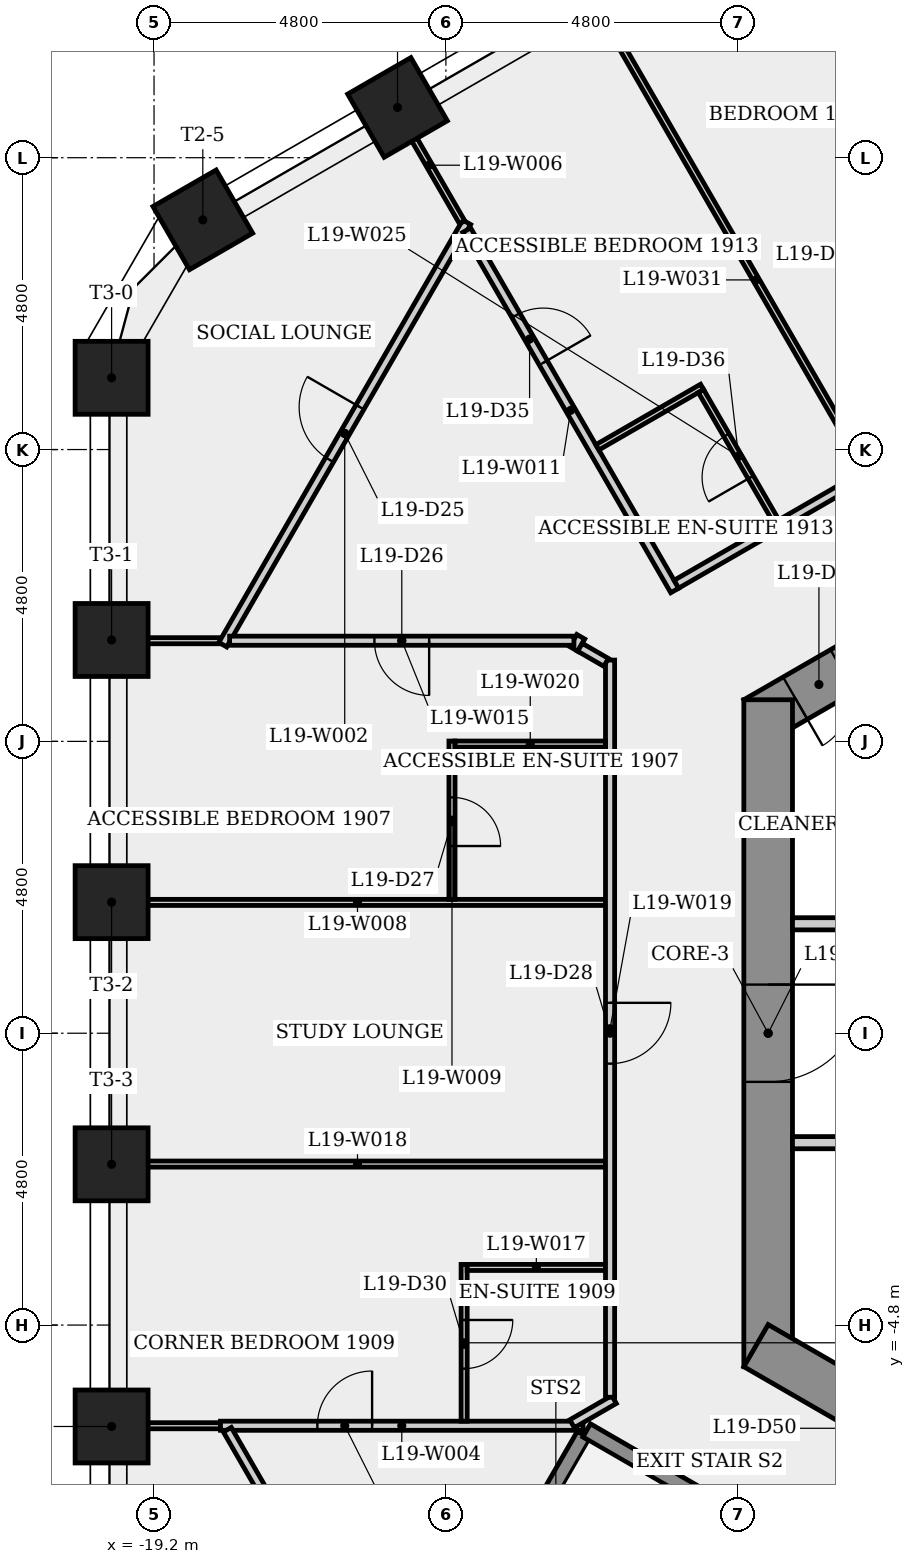
"""IFC4 building model, lengths in metres.
Left out: names, types, materials, properties, quantities, classifications, styles, units other than length and angle.
Written with IfcOpenShell. Run it as: python <this file> out.ifc"""

import sys

from ifc_helpers import new_model, si_unit, direction, frame, frame_2d, origin, origin_2d, place, context, subcontext, project, spatial, rectangle, extrude, element, fill, save


model = new_model("IFC4")
c1 = context("Model", 3, precision=1e-05, world=origin(), true_north=direction((0.0, 1.0)))
c2 = subcontext(c1, "Body", "Model", "MODEL_VIEW")
j1 = project(units=[si_unit("LENGTHUNIT", "METRE"), si_unit("PLANEANGLEUNIT", "RADIAN")], contexts=[c1])
p1 = place(None, origin())
s1 = spatial("IfcSite", under=j1, at=p1, CompositionType="ELEMENT")
p2 = place(p1, origin())
s2 = spatial("IfcBuilding", under=s1, at=p2, CompositionType="ELEMENT")
p3 = place(p2, frame((0.0, 0.0, 74.3)))
s3 = spatial("IfcBuildingStorey", under=s2, at=p3, CompositionType="ELEMENT", Elevation=74.3)
p4 = place(p3, frame((0.2, 10.623, 0.0), z_axis=(0.0, 0.0, 1.0), x_axis=(-0.866023993627, -0.500002442456, 0.0)))
e1 = element("IfcWall", 1, at=p4, inside=s3, PredefinedType="SHEAR", context=c2, shape_type="SweptSolid", body=[
    extrude(rectangle(XDim=10.97, YDim=0.8, at=frame_2d((5.485, 0.0))), origin(), (0.0, 0.0, 1.0), 4.0),
])
p5 = place(p4, frame((9.325, 0.0, 0.0)))
e2 = element("IfcOpeningElement", 2, at=p5, cuts=e1, PredefinedType="OPENING", context=c2, shape_type="SweptSolid", body=[
    extrude(rectangle(XDim=0.9, YDim=2.1, at=frame_2d((0.45, 1.05))), frame((0.0, 0.41, 0.0), z_axis=(0.0, -1.0, 0.0), x_axis=(1.0, 0.0, 0.0)), (0.0, 0.0, 1.0), 0.82),
])
p6 = place(p4, frame((2.091, 0.0, 0.0)))
e3 = element("IfcOpeningElement", 3, at=p6, cuts=e1, PredefinedType="OPENING", context=c2, shape_type="SweptSolid", body=[
    extrude(rectangle(XDim=0.9, YDim=2.1, at=frame_2d((0.45, 1.05))), frame((0.0, 0.41, 0.0), z_axis=(0.0, -1.0, 0.0), x_axis=(1.0, 0.0, 0.0)), (0.0, 0.0, 1.0), 0.82),
])
p7 = place(p3, frame((-9.1, 5.485, 0.0), z_axis=(0.0, 0.0, 1.0), x_axis=(0.0, -1.0, 0.0)))
e4 = element("IfcWall", 4, at=p7, inside=s3, PredefinedType="SHEAR", context=c2, shape_type="SweptSolid", body=[
    extrude(rectangle(XDim=10.97, YDim=0.8, at=frame_2d((5.485, 0.0))), origin(), (0.0, 0.0, 1.0), 4.0),
])
p8 = place(p7, frame((4.685, 0.0, 0.0)))
e5 = element("IfcOpeningElement", 5, at=p8, cuts=e4, PredefinedType="OPENING", context=c2, shape_type="SweptSolid", body=[
    extrude(rectangle(XDim=1.6, YDim=2.1, at=frame_2d((0.8, 1.05))), frame((0.0, 0.41, 0.0), z_axis=(0.0, -1.0, 0.0), x_axis=(1.0, 0.0, 0.0)), (0.0, 0.0, 1.0), 0.82),
])
p9 = place(p3, frame((-9.3, -5.138, 0.0), z_axis=(0.0, 0.0, 1.0), x_axis=(0.866023993627, -0.500002442456, 0.0)))
e6 = element("IfcWall", 6, at=p9, inside=s3, PredefinedType="SHEAR", context=c2, shape_type="SweptSolid", body=[
    extrude(rectangle(XDim=10.97, YDim=0.8, at=frame_2d((5.485, 0.0))), origin(), (0.0, 0.0, 1.0), 4.0),
])
p10 = place(p9, frame((2.268, 0.0, 0.0)))
e7 = element("IfcOpeningElement", 7, at=p10, cuts=e6, PredefinedType="OPENING", context=c2, shape_type="SweptSolid", body=[
    extrude(rectangle(XDim=0.9, YDim=2.1, at=frame_2d((0.45, 1.05))), frame((0.0, 0.41, 0.0), z_axis=(0.0, -1.0, 0.0), x_axis=(1.0, 0.0, 0.0)), (0.0, 0.0, 1.0), 0.82),
])
p11 = place(p9, frame((8.903, 0.0, 0.0)))
e8 = element("IfcOpeningElement", 8, at=p11, cuts=e6, PredefinedType="OPENING", context=c2, shape_type="SweptSolid", body=[
    extrude(rectangle(XDim=0.9, YDim=2.1, at=frame_2d((0.45, 1.05))), frame((0.0, 0.41, 0.0), z_axis=(0.0, -1.0, 0.0), x_axis=(1.0, 0.0, 0.0)), (0.0, 0.0, 1.0), 0.82),
])
for number, where, z_axis, x_axis in (
    (9, (-15.196, 15.227, 0.0), (0.0, 0.0, 1.0), (-0.5, 0.866, 0.0)),
    (10, (-18.398, 13.378, 0.0), (0.0, 0.0, 1.0), (-0.5, 0.866, 0.0)),
    (11, (-19.898, 10.78, 0.0), (0.0, 0.0, 1.0), (-1.0, 0.0, 0.0)),
    (12, (-19.898, 6.468, 0.0), (0.0, 0.0, 1.0), (-1.0, 0.0, 0.0)),
    (13, (-19.898, 2.156, 0.0), (0.0, 0.0, 1.0), (-1.0, 0.0, 0.0)),
    (14, (-19.898, -2.156, 0.0), (0.0, 0.0, 1.0), (-1.0, 0.0, 0.0)),
    (15, (-19.898, -6.468, 0.0), (0.0, 0.0, 1.0), (-1.0, 0.0, 0.0)),
):
    element("IfcColumn", number, at=place(p3, frame(where, z_axis=z_axis, x_axis=x_axis)), inside=s3, PredefinedType="COLUMN", context=c2, shape_type="SweptSolid", body=[
        extrude(rectangle(XDim=1.2, YDim=1.2, at=origin_2d()), origin(), (0.0, 0.0, 1.0), 4.0),
    ])
p12 = place(p3, frame((-18.107, 6.456, 0.0), z_axis=(0.0, 0.0, 1.0), x_axis=(-1.0, 0.0, 0.0)))
e16 = element("IfcWall", 16, at=p12, inside=s3, PredefinedType="PARTITIONING", context=c2, shape_type="SweptSolid", body=[
    extrude(rectangle(XDim=1.826, YDim=0.1, at=frame_2d((0.913, 0.0))), origin(), (0.0, 0.0, 1.0), 3.6),
])
p13 = place(p3, frame((-18.07, 6.391, 0.0), z_axis=(0.0, 0.0, 1.0), x_axis=(0.500007837663, 0.86602087866, 0.0)))
e17 = element("IfcWall", 17, at=p13, inside=s3, PredefinedType="PARTITIONING", context=c2, shape_type="SweptSolid", body=[
    extrude(rectangle(XDim=8.022, YDim=0.15, at=frame_2d((4.011, 0.0))), origin(), (0.0, 0.0, 1.0), 3.6),
])
p14 = place(p13, frame((3.511, 0.0, 0.0)))
e18 = element("IfcOpeningElement", 18, at=p14, cuts=e17, PredefinedType="OPENING", context=c2, shape_type="SweptSolid", body=[
    extrude(rectangle(XDim=1.0, YDim=2.1, at=frame_2d((0.5, 1.05))), frame((0.0, 0.085, 0.0), z_axis=(0.0, -1.0, 0.0), x_axis=(1.0, 0.0, 0.0)), (0.0, 0.0, 1.0), 0.17),
])
p15 = place(p3, frame((-18.107, -6.456, 0.0), z_axis=(0.0, 0.0, 1.0), x_axis=(-1.0, 0.0, 0.0)))
e19 = element("IfcWall", 19, at=p15, inside=s3, PredefinedType="PARTITIONING", context=c2, shape_type="SweptSolid", body=[
    extrude(rectangle(XDim=1.826, YDim=0.1, at=frame_2d((0.913, 0.0))), origin(), (0.0, 0.0, 1.0), 3.6),
])
p16 = place(p3, frame((-18.107, -6.456, 0.0), z_axis=(0.0, 0.0, 1.0), x_axis=(1.0, 0.0, 0.0)))
e20 = element("IfcWall", 20, at=p16, inside=s3, PredefinedType="PARTITIONING", context=c2, shape_type="SweptSolid", body=[
    extrude(rectangle(XDim=5.963, YDim=0.15, at=frame_2d((2.981, 0.0))), origin(), (0.0, 0.0, 1.0), 3.6),
])
p17 = place(p16, frame((1.593, 0.0, 0.0)))
e21 = element("IfcOpeningElement", 21, at=p17, cuts=e20, PredefinedType="OPENING", context=c2, shape_type="SweptSolid", body=[
    extrude(rectangle(XDim=0.9, YDim=2.1, at=frame_2d((0.45, 1.05))), frame((0.0, 0.085, 0.0), z_axis=(0.0, -1.0, 0.0), x_axis=(1.0, 0.0, 0.0)), (0.0, 0.0, 1.0), 0.17),
])
p18 = place(p3, frame((-15.217, 15.215, 0.0), z_axis=(0.0, 0.0, 1.0), x_axis=(0.500005339912, -0.866022320763, 0.0)))
e22 = element("IfcWall", 22, at=p18, inside=s3, PredefinedType="PARTITIONING", context=c2, shape_type="SweptSolid", body=[
    extrude(rectangle(XDim=2.167, YDim=0.1, at=frame_2d((1.083, 0.0))), origin(), (0.0, 0.0, 1.0), 3.6),
])
p19 = place(p3, frame((-15.087, -11.558, 0.0), z_axis=(0.0, 0.0, 1.0), x_axis=(-0.499958648831, 0.866049276577, 0.0)))
e23 = element("IfcWall", 23, at=p19, inside=s3, PredefinedType="PARTITIONING", context=c2, shape_type="SweptSolid", body=[
    extrude(rectangle(XDim=5.816, YDim=0.15, at=frame_2d((2.908, 0.0))), origin(), (0.0, 0.0, 1.0), 3.6),
])
p20 = place(p19, frame((2.408, 0.0, 0.0)))
e24 = element("IfcOpeningElement", 24, at=p20, cuts=e23, PredefinedType="OPENING", context=c2, shape_type="SweptSolid", body=[
    extrude(rectangle(XDim=1.0, YDim=2.1, at=frame_2d((0.5, 1.05))), frame((0.0, 0.085, 0.0), z_axis=(0.0, -1.0, 0.0), x_axis=(1.0, 0.0, 0.0)), (0.0, 0.0, 1.0), 0.17),
])
p21 = place(p3, frame((-19.933, 2.152, 0.0), z_axis=(0.0, 0.0, 1.0), x_axis=(1.0, 0.0, 0.0)))
e25 = element("IfcWall", 25, at=p21, inside=s3, PredefinedType="PARTITIONING", context=c2, shape_type="SweptSolid", body=[
    extrude(rectangle(XDim=8.158, YDim=0.1, at=frame_2d((4.079, 0.0))), origin(), (0.0, 0.0, 1.0), 3.6),
])
p22 = place(p3, frame((-14.3, 4.806, 0.0), z_axis=(0.0, 0.0, 1.0), x_axis=(0.0, -1.0, 0.0)))
e26 = element("IfcWall", 26, at=p22, inside=s3, PredefinedType="PARTITIONING", context=c2, shape_type="SweptSolid", body=[
    extrude(rectangle(XDim=2.604, YDim=0.1, at=frame_2d((1.302, 0.0))), origin(), (0.0, 0.0, 1.0), 3.6),
])
p23 = place(p22, frame((0.927, 0.0, 0.0)))
e27 = element("IfcOpeningElement", 27, at=p23, cuts=e26, PredefinedType="OPENING", context=c2, shape_type="SweptSolid", body=[
    extrude(rectangle(XDim=0.8, YDim=2.1, at=frame_2d((0.4, 1.05))), frame((0.0, 0.06, 0.0), z_axis=(0.0, -1.0, 0.0), x_axis=(1.0, 0.0, 0.0)), (0.0, 0.0, 1.0), 0.12),
])
p24 = place(p3, frame((-14.1, -3.802, 0.0), z_axis=(0.0, 0.0, 1.0), x_axis=(0.0, -1.0, 0.0)))
e28 = element("IfcWall", 28, at=p24, inside=s3, PredefinedType="PARTITIONING", context=c2, shape_type="SweptSolid", body=[
    extrude(rectangle(XDim=2.579, YDim=0.1, at=frame_2d((1.29, 0.0))), origin(), (0.0, 0.0, 1.0), 3.6),
])
p25 = place(p24, frame((0.914, 0.0, 0.0)))
e29 = element("IfcOpeningElement", 29, at=p25, cuts=e28, PredefinedType="OPENING", context=c2, shape_type="SweptSolid", body=[
    extrude(rectangle(XDim=0.8, YDim=2.1, at=frame_2d((0.4, 1.05))), frame((0.0, 0.06, 0.0), z_axis=(0.0, -1.0, 0.0), x_axis=(1.0, 0.0, 0.0)), (0.0, 0.0, 1.0), 0.12),
])
p26 = place(p3, frame((-14.058, 13.208, 0.0), z_axis=(0.0, 0.0, 1.0), x_axis=(0.500010691388, -0.866019231021, 0.0)))
e30 = element("IfcWall", 30, at=p26, inside=s3, PredefinedType="PARTITIONING", context=c2, shape_type="SweptSolid", body=[
    extrude(rectangle(XDim=6.843, YDim=0.15, at=frame_2d((3.421, 0.0))), origin(), (0.0, 0.0, 1.0), 3.6),
])
p27 = place(p26, frame((1.619, 0.0, 0.0)))
e31 = element("IfcOpeningElement", 31, at=p27, cuts=e30, PredefinedType="OPENING", context=c2, shape_type="SweptSolid", body=[
    extrude(rectangle(XDim=0.9, YDim=2.1, at=frame_2d((0.45, 1.05))), frame((0.0, 0.085, 0.0), z_axis=(0.0, -1.0, 0.0), x_axis=(1.0, 0.0, 0.0)), (0.0, 0.0, 1.0), 0.17),
])
p28 = place(p3, frame((-13.648, -9.239, 0.0), z_axis=(0.0, 0.0, 1.0), x_axis=(0.50000556753, 0.866022189346, 0.0)))
e32 = element("IfcWall", 32, at=p28, inside=s3, PredefinedType="SHEAR", context=c2, shape_type="SweptSolid", body=[
    extrude(rectangle(XDim=3.036, YDim=0.25, at=frame_2d((1.518, 0.0))), origin(), (0.0, 0.0, 1.0), 3.6),
])
p29 = place(p3, frame((-12.297, 6.32, 0.0), z_axis=(0.0, 0.0, 1.0), x_axis=(0.499996383721, 0.866027491634, 0.0)))
e33 = element("IfcWall", 33, at=p29, inside=s3, PredefinedType="PARTITIONING", context=c2, shape_type="SweptSolid", body=[
    extrude(rectangle(XDim=0.231, YDim=0.15, at=frame_2d((0.116, 0.0))), origin(), (0.0, 0.0, 1.0), 3.6),
])
p30 = place(p3, frame((-12.325, -6.423, 0.0), z_axis=(0.0, 0.0, 1.0), x_axis=(0.86602732995, 0.499996663769, 0.0)))
e34 = element("IfcWall", 34, at=p30, inside=s3, PredefinedType="PARTITIONING", context=c2, shape_type="SweptSolid", body=[
    extrude(rectangle(XDim=0.796, YDim=0.15, at=frame_2d((0.398, 0.0))), origin(), (0.0, 0.0, 1.0), 3.6),
])
p31 = place(p3, frame((-12.294, 6.456, 0.0), z_axis=(0.0, 0.0, 1.0), x_axis=(-1.0, 0.0, 0.0)))
e35 = element("IfcWall", 35, at=p31, inside=s3, PredefinedType="PARTITIONING", context=c2, shape_type="SweptSolid", body=[
    extrude(rectangle(XDim=5.663, YDim=0.15, at=frame_2d((2.832, 0.0))), origin(), (0.0, 0.0, 1.0), 3.6),
])
p32 = place(p31, frame((2.381, 0.0, 0.0)))
e36 = element("IfcOpeningElement", 36, at=p32, cuts=e35, PredefinedType="OPENING", context=c2, shape_type="SweptSolid", body=[
    extrude(rectangle(XDim=0.9, YDim=2.1, at=frame_2d((0.45, 1.05))), frame((0.0, 0.085, 0.0), z_axis=(0.0, -1.0, 0.0), x_axis=(1.0, 0.0, 0.0)), (0.0, 0.0, 1.0), 0.17),
])
p33 = place(p3, frame((-12.085, -6.532, 0.0), z_axis=(0.0, 0.0, 1.0), x_axis=(0.86604373436, -0.499968249168, 0.0)))
e37 = element("IfcWall", 37, at=p33, inside=s3, PredefinedType="SHEAR", context=c2, shape_type="SweptSolid", body=[
    extrude(rectangle(XDim=1.118, YDim=0.25, at=frame_2d((0.559, 0.0))), origin(), (0.0, 0.0, 1.0), 3.6),
])
p34 = place(p3, frame((-11.775, -3.852, 0.0), z_axis=(0.0, 0.0, 1.0), x_axis=(-1.0, 0.0, 0.0)))
e38 = element("IfcWall", 38, at=p34, inside=s3, PredefinedType="PARTITIONING", context=c2, shape_type="SweptSolid", body=[
    extrude(rectangle(XDim=2.275, YDim=0.1, at=frame_2d((1.138, 0.0))), origin(), (0.0, 0.0, 1.0), 3.6),
])
p35 = place(p3, frame((-11.775, -2.152, 0.0), z_axis=(0.0, 0.0, 1.0), x_axis=(-1.0, 0.0, 0.0)))
e39 = element("IfcWall", 39, at=p35, inside=s3, PredefinedType="PARTITIONING", context=c2, shape_type="SweptSolid", body=[
    extrude(rectangle(XDim=8.158, YDim=0.1, at=frame_2d((4.079, 0.0))), origin(), (0.0, 0.0, 1.0), 3.6),
])
p36 = place(p3, frame((-11.7, 6.137, 0.0), z_axis=(0.0, 0.0, 1.0), x_axis=(0.0, -1.0, 0.0)))
e40 = element("IfcWall", 40, at=p36, inside=s3, PredefinedType="PARTITIONING", context=c2, shape_type="SweptSolid", body=[
    extrude(rectangle(XDim=12.125, YDim=0.15, at=frame_2d((6.062, 0.0))), origin(), (0.0, 0.0, 1.0), 3.6),
])
p37 = place(p36, frame((5.637, 0.0, 0.0)))
e41 = element("IfcOpeningElement", 41, at=p37, cuts=e40, PredefinedType="OPENING", context=c2, shape_type="SweptSolid", body=[
    extrude(rectangle(XDim=1.0, YDim=2.1, at=frame_2d((0.5, 1.05))), frame((0.0, 0.085, 0.0), z_axis=(0.0, -1.0, 0.0), x_axis=(1.0, 0.0, 0.0)), (0.0, 0.0, 1.0), 0.17),
])
p38 = place(p3, frame((-11.775, 4.756, 0.0), z_axis=(0.0, 0.0, 1.0), x_axis=(-1.0, 0.0, 0.0)))
e42 = element("IfcWall", 42, at=p38, inside=s3, PredefinedType="PARTITIONING", context=c2, shape_type="SweptSolid", body=[
    extrude(rectangle(XDim=2.475, YDim=0.1, at=frame_2d((1.238, 0.0))), origin(), (0.0, 0.0, 1.0), 3.6),
])
p39 = place(p3, frame((-11.765, 6.1, 0.0), z_axis=(0.0, 0.0, 1.0), x_axis=(-0.865964461276, 0.500105540669, 0.0)))
e43 = element("IfcWall", 43, at=p39, inside=s3, PredefinedType="PARTITIONING", context=c2, shape_type="SweptSolid", body=[
    extrude(rectangle(XDim=0.497, YDim=0.15, at=frame_2d((0.248, 0.0))), origin(), (0.0, 0.0, 1.0), 3.6),
])
p40 = place(p3, frame((-11.1, -7.101, 0.0), z_axis=(0.0, 0.0, 1.0), x_axis=(0.866028615007, -0.499994437958, 0.0)))
e44 = element("IfcWall", 44, at=p40, inside=s3, PredefinedType="SHEAR", context=c2, shape_type="SweptSolid", body=[
    extrude(rectangle(XDim=5.387, YDim=0.25, at=frame_2d((2.694, 0.0))), origin(), (0.0, 0.0, 1.0), 3.6),
])
p41 = place(p40, frame((4.012, 0.0, 0.0)))
e45 = element("IfcOpeningElement", 45, at=p41, cuts=e44, PredefinedType="OPENING", context=c2, shape_type="SweptSolid", body=[
    extrude(rectangle(XDim=1.0, YDim=2.1, at=frame_2d((0.5, 1.05))), frame((0.0, 0.135, 0.0), z_axis=(0.0, -1.0, 0.0), x_axis=(1.0, 0.0, 0.0)), (0.0, 0.0, 1.0), 0.27),
])
p42 = place(p3, frame((-10.609, 7.385, 0.0), z_axis=(0.0, 0.0, 1.0), x_axis=(0.866027371756, 0.499996591357, 0.0)))
e46 = element("IfcWall", 46, at=p42, inside=s3, PredefinedType="PARTITIONING", context=c2, shape_type="SweptSolid", body=[
    extrude(rectangle(XDim=10.741, YDim=0.15, at=frame_2d((5.371, 0.0))), origin(), (0.0, 0.0, 1.0), 3.6),
])
p43 = place(p42, frame((4.039, 0.0, 0.0)))
e47 = element("IfcOpeningElement", 47, at=p43, cuts=e46, PredefinedType="OPENING", context=c2, shape_type="SweptSolid", body=[
    extrude(rectangle(XDim=0.9, YDim=2.1, at=frame_2d((0.45, 1.05))), frame((0.0, 0.085, 0.0), z_axis=(0.0, -1.0, 0.0), x_axis=(1.0, 0.0, 0.0)), (0.0, 0.0, 1.0), 0.17),
])
p44 = place(p3, frame((-10.187, 10.631, 0.0), z_axis=(0.0, 0.0, 1.0), x_axis=(-0.866058830921, -0.499942098031, 0.0)))
e48 = element("IfcWall", 48, at=p44, inside=s3, PredefinedType="PARTITIONING", context=c2, shape_type="SweptSolid", body=[
    extrude(rectangle(XDim=1.989, YDim=0.1, at=frame_2d((0.994, 0.0))), origin(), (0.0, 0.0, 1.0), 3.6),
])
p45 = place(p3, frame((-8.968, 8.419, 0.0), z_axis=(0.0, 0.0, 1.0), x_axis=(-0.4999899861, 0.866031185235, 0.0)))
e49 = element("IfcWall", 49, at=p45, inside=s3, PredefinedType="PARTITIONING", context=c2, shape_type="SweptSolid", body=[
    extrude(rectangle(XDim=2.475, YDim=0.1, at=frame_2d((1.238, 0.0))), origin(), (0.0, 0.0, 1.0), 3.6),
])
p46 = place(p45, frame((0.837, 0.0, 0.0)))
e50 = element("IfcOpeningElement", 50, at=p46, cuts=e49, PredefinedType="OPENING", context=c2, shape_type="SweptSolid", body=[
    extrude(rectangle(XDim=0.8, YDim=2.1, at=frame_2d((0.4, 1.05))), frame((0.0, 0.06, 0.0), z_axis=(0.0, -1.0, 0.0), x_axis=(1.0, 0.0, 0.0)), (0.0, 0.0, 1.0), 0.12),
])
p47 = place(p3, frame((-8.7, 1.8, 0.0), z_axis=(0.0, 0.0, 1.0), x_axis=(1.0, 0.0, 0.0)))
e51 = element("IfcWall", 51, at=p47, inside=s3, PredefinedType="PARTITIONING", context=c2, shape_type="SweptSolid", body=[
    extrude(rectangle(XDim=1.225, YDim=0.2, at=frame_2d((0.613, 0.0))), origin(), (0.0, 0.0, 1.0), 3.6),
])
p48 = place(p3, frame((-7.496, 9.269, 0.0), z_axis=(0.0, 0.0, 1.0), x_axis=(-0.500009404554, 0.866019973994, 0.0)))
e52 = element("IfcWall", 52, at=p48, inside=s3, PredefinedType="PARTITIONING", context=c2, shape_type="SweptSolid", body=[
    extrude(rectangle(XDim=9.01, YDim=0.1, at=frame_2d((4.505, 0.0))), origin(), (0.0, 0.0, 1.0), 3.6),
])
p49 = place(p3, frame((-7.475, -1.8, 0.0), z_axis=(0.0, 0.0, 1.0), x_axis=(-1.0, 0.0, 0.0)))
e53 = element("IfcWall", 53, at=p49, inside=s3, PredefinedType="PARTITIONING", context=c2, shape_type="SweptSolid", body=[
    extrude(rectangle(XDim=1.225, YDim=0.2, at=frame_2d((0.613, 0.0))), origin(), (0.0, 0.0, 1.0), 3.6),
])
p50 = place(p3, frame((-8.784, 18.928, 0.0), z_axis=(0.0, 0.0, 1.0), x_axis=(0.500009404554, -0.866019973994, 0.0)))
e54 = element("IfcWall", 54, at=p50, inside=s3, PredefinedType="PARTITIONING", context=c2, shape_type="SweptSolid", body=[
    extrude(rectangle(XDim=9.01, YDim=0.1, at=frame_2d((4.505, 0.0))), origin(), (0.0, 0.0, 1.0), 3.6),
])
p51 = place(p14, origin())
e55 = element("IfcDoor", 55, at=p51, inside=s3, OperationType="SINGLE_SWING_RIGHT", PredefinedType="DOOR", context=c2, shape_type="SweptSolid", body=[
    extrude(rectangle(XDim=1.0, YDim=2.1, at=frame_2d((0.5, 1.05))), frame((0.0, 0.025, 0.0), z_axis=(0.0, -1.0, 0.0), x_axis=(1.0, 0.0, 0.0)), (0.0, 0.0, 1.0), 0.05),
])
fill(e18, e55)
p52 = place(p32, origin())
e56 = element("IfcDoor", 56, at=p52, inside=s3, OperationType="SINGLE_SWING_LEFT", PredefinedType="DOOR", context=c2, shape_type="SweptSolid", body=[
    extrude(rectangle(XDim=0.9, YDim=2.1, at=frame_2d((0.45, 1.05))), frame((0.0, 0.025, 0.0), z_axis=(0.0, -1.0, 0.0), x_axis=(1.0, 0.0, 0.0)), (0.0, 0.0, 1.0), 0.05),
])
fill(e36, e56)
p53 = place(p23, origin())
e57 = element("IfcDoor", 57, at=p53, inside=s3, OperationType="SINGLE_SWING_RIGHT", PredefinedType="DOOR", context=c2, shape_type="SweptSolid", body=[
    extrude(rectangle(XDim=0.8, YDim=2.1, at=frame_2d((0.4, 1.05))), frame((0.0, 0.025, 0.0), z_axis=(0.0, -1.0, 0.0), x_axis=(1.0, 0.0, 0.0)), (0.0, 0.0, 1.0), 0.05),
])
fill(e27, e57)
p54 = place(p37, origin())
e58 = element("IfcDoor", 58, at=p54, inside=s3, OperationType="SINGLE_SWING_LEFT", PredefinedType="DOOR", context=c2, shape_type="SweptSolid", body=[
    extrude(rectangle(XDim=1.0, YDim=2.1, at=frame_2d((0.5, 1.05))), frame((0.0, 0.025, 0.0), z_axis=(0.0, -1.0, 0.0), x_axis=(1.0, 0.0, 0.0)), (0.0, 0.0, 1.0), 0.05),
])
fill(e41, e58)
p55 = place(p17, origin())
e59 = element("IfcDoor", 59, at=p55, inside=s3, OperationType="SINGLE_SWING_RIGHT", PredefinedType="DOOR", context=c2, shape_type="SweptSolid", body=[
    extrude(rectangle(XDim=0.9, YDim=2.1, at=frame_2d((0.45, 1.05))), frame((0.0, 0.025, 0.0), z_axis=(0.0, -1.0, 0.0), x_axis=(1.0, 0.0, 0.0)), (0.0, 0.0, 1.0), 0.05),
])
fill(e21, e59)
p56 = place(p25, origin())
e60 = element("IfcDoor", 60, at=p56, inside=s3, OperationType="SINGLE_SWING_LEFT", PredefinedType="DOOR", context=c2, shape_type="SweptSolid", body=[
    extrude(rectangle(XDim=0.8, YDim=2.1, at=frame_2d((0.4, 1.05))), frame((0.0, 0.025, 0.0), z_axis=(0.0, -1.0, 0.0), x_axis=(1.0, 0.0, 0.0)), (0.0, 0.0, 1.0), 0.05),
])
fill(e29, e60)
p57 = place(p27, origin())
e61 = element("IfcDoor", 61, at=p57, inside=s3, OperationType="SINGLE_SWING_RIGHT", PredefinedType="DOOR", context=c2, shape_type="SweptSolid", body=[
    extrude(rectangle(XDim=0.9, YDim=2.1, at=frame_2d((0.45, 1.05))), frame((0.0, 0.025, 0.0), z_axis=(0.0, -1.0, 0.0), x_axis=(1.0, 0.0, 0.0)), (0.0, 0.0, 1.0), 0.05),
])
fill(e31, e61)
p58 = place(p46, origin())
e62 = element("IfcDoor", 62, at=p58, inside=s3, OperationType="SINGLE_SWING_LEFT", PredefinedType="DOOR", context=c2, shape_type="SweptSolid", body=[
    extrude(rectangle(XDim=0.8, YDim=2.1, at=frame_2d((0.4, 1.05))), frame((0.0, 0.025, 0.0), z_axis=(0.0, -1.0, 0.0), x_axis=(1.0, 0.0, 0.0)), (0.0, 0.0, 1.0), 0.05),
])
fill(e50, e62)
p59 = place(p5, origin())
e63 = element("IfcDoor", 63, at=p59, inside=s3, OperationType="SINGLE_SWING_RIGHT", PredefinedType="DOOR", context=c2, shape_type="SweptSolid", body=[
    extrude(rectangle(XDim=0.9, YDim=2.1, at=frame_2d((0.45, 1.05))), frame((0.0, 0.025, 0.0), z_axis=(0.0, -1.0, 0.0), x_axis=(1.0, 0.0, 0.0)), (0.0, 0.0, 1.0), 0.05),
])
fill(e2, e63)
p60 = place(p8, origin())
e64 = element("IfcDoor", 64, at=p60, inside=s3, OperationType="SINGLE_SWING_LEFT", PredefinedType="DOOR", context=c2, shape_type="SweptSolid", body=[
    extrude(rectangle(XDim=1.6, YDim=2.1, at=frame_2d((0.8, 1.05))), frame((0.0, 0.025, 0.0), z_axis=(0.0, -1.0, 0.0), x_axis=(1.0, 0.0, 0.0)), (0.0, 0.0, 1.0), 0.05),
])
fill(e5, e64)
save(model, sys.argv[1])
